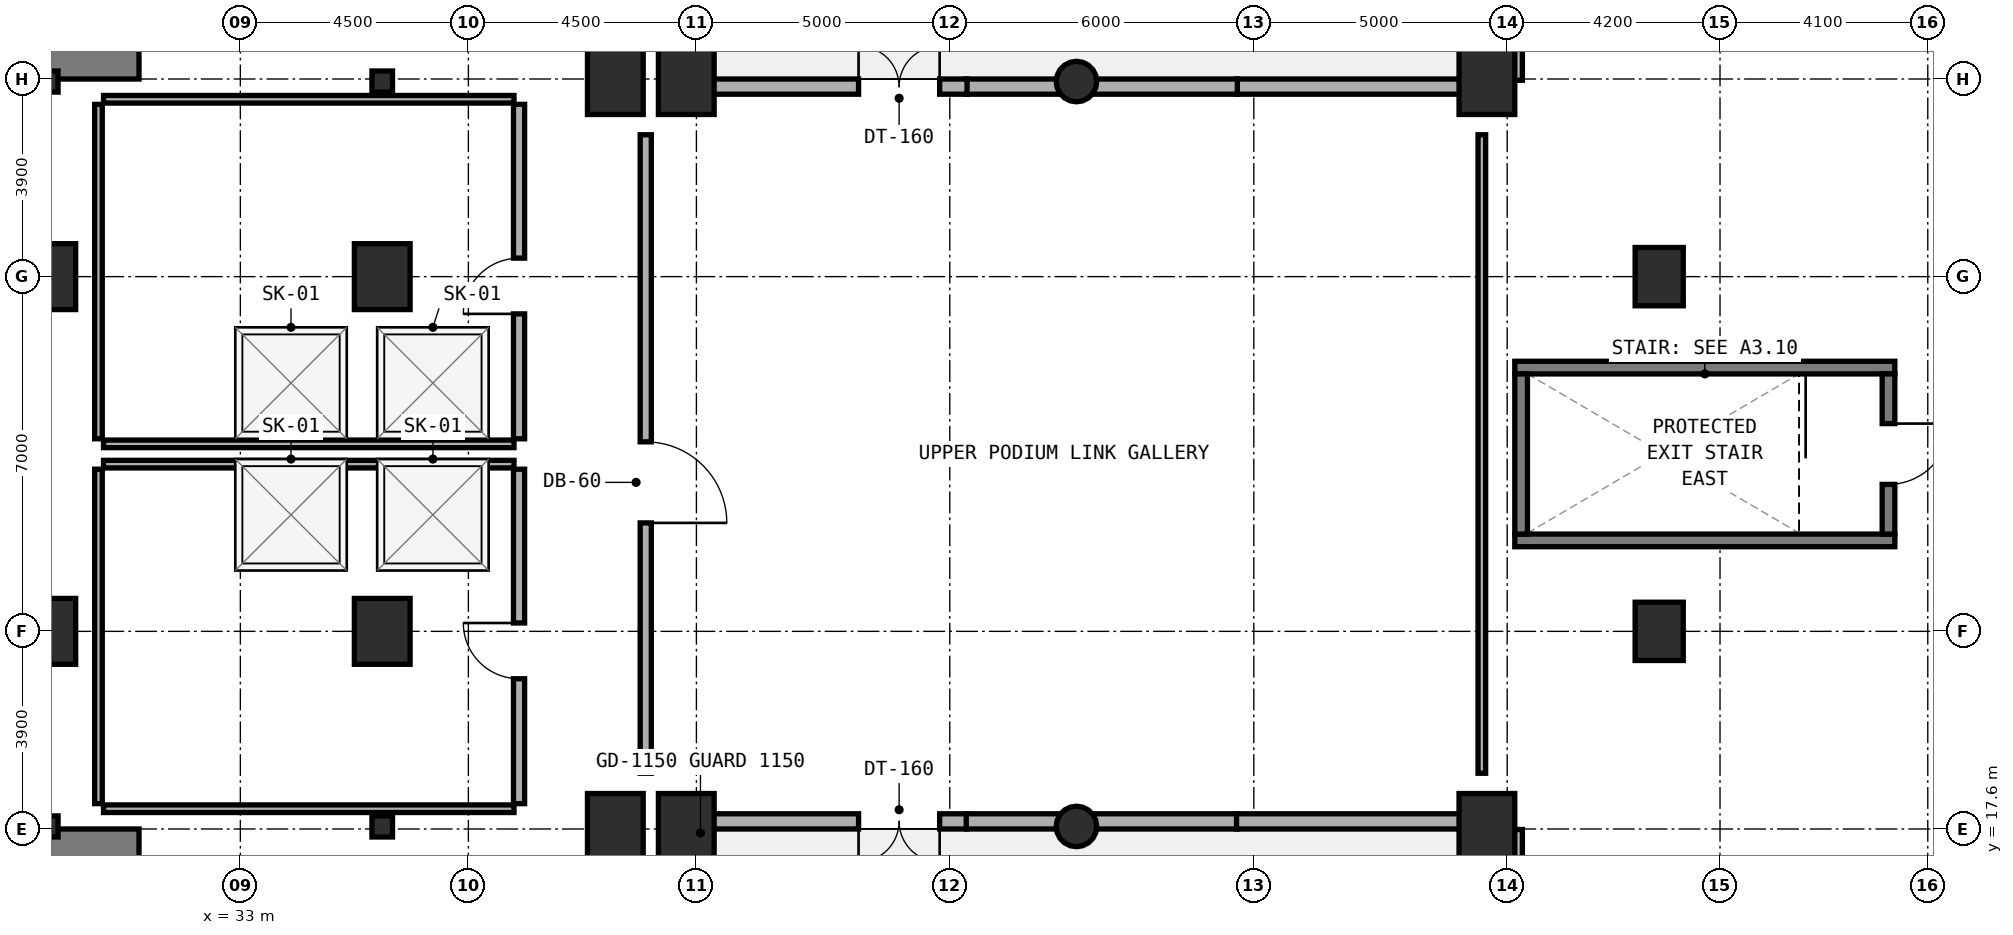
"""IFC4 building model, lengths in metres.
Left out: names, types, materials, properties, quantities, classifications, styles, units other than length and angle.
Written with IfcOpenShell. Run it as: python <this file> out.ifc"""

import sys

from ifc_helpers import new_model, si_unit, direction, frame, frame_2d, origin, origin_2d, place, context, subcontext, project, spatial, rectangle, circle, i_section, extrude, element, fill, save


model = new_model("IFC4")
c1 = context("Model", 3, precision=1e-05, world=origin(), true_north=direction((0.0, 1.0)))
c2 = subcontext(c1, "Body", "Model", "MODEL_VIEW")
j1 = project(units=[si_unit("LENGTHUNIT", "METRE"), si_unit("PLANEANGLEUNIT", "RADIAN")], contexts=[c1])
p1 = place(None, origin())
s1 = spatial("IfcSite", under=j1, at=p1, CompositionType="ELEMENT")
p2 = place(p1, origin())
s2 = spatial("IfcBuilding", under=s1, at=p2, CompositionType="ELEMENT")
p3 = place(p2, frame((0.0, 0.0, 19.5)))
s3 = spatial("IfcBuildingStorey", under=s2, at=p3, CompositionType="ELEMENT", Elevation=19.5)
for number, where, z_axis, x_axis in (
    (1, (6.2, 32.7, 0.0), (0.0, 0.0, 1.0), (1.0, 0.0, 0.0)),
    (2, (6.2, 17.3, 0.0), (0.0, 0.0, 1.0), (1.0, 0.0, 0.0)),
):
    element("IfcWall", number, at=place(p3, frame(where, z_axis=z_axis, x_axis=x_axis)), inside=s3, PredefinedType="SHEAR", context=c2, shape_type="SweptSolid", body=[
        extrude(rectangle(XDim=24.8, YDim=0.6, at=frame_2d((12.4, 0.0))), origin(), (0.0, 0.0, 1.0), 4.5),
    ])
for number, where, z_axis, x_axis in (
    (3, (58.15, 23.295, 0.0), (0.0, 0.0, 1.0), (1.0, 0.0, 0.0)),
    (4, (58.15, 26.705, 0.0), (0.0, 0.0, 1.0), (1.0, 0.0, 0.0)),
):
    element("IfcWall", number, at=place(p3, frame(where, z_axis=z_axis, x_axis=x_axis)), inside=s3, PredefinedType="STANDARD", context=c2, shape_type="SweptSolid", body=[
        extrude(rectangle(XDim=7.5, YDim=0.25, at=frame_2d((3.75, 0.0))), origin(), (0.0, 0.0, 1.0), 4.5),
    ])
p4 = place(p3, frame((58.275, 23.42, 0.0), z_axis=(0.0, 0.0, 1.0), x_axis=(0.0, 1.0, 0.0)))
e5 = element("IfcWall", 5, at=p4, inside=s3, PredefinedType="STANDARD", context=c2, shape_type="SweptSolid", body=[
    extrude(rectangle(XDim=3.16, YDim=0.25, at=frame_2d((1.58, 0.0))), origin(), (0.0, 0.0, 1.0), 4.5),
])
p5 = place(p3, frame((65.525, 23.42, 0.0), z_axis=(0.0, 0.0, 1.0), x_axis=(0.0, 1.0, 0.0)))
e6 = element("IfcWall", 6, at=p5, inside=s3, PredefinedType="STANDARD", context=c2, shape_type="SweptSolid", body=[
    extrude(rectangle(XDim=3.16, YDim=0.25, at=frame_2d((1.58, 0.0))), origin(), (0.0, 0.0, 1.0), 4.5),
])
p6 = place(p5, frame((0.98, 0.0, 0.0)))
e7 = element("IfcOpeningElement", 7, at=p6, cuts=e6, PredefinedType="OPENING", context=c2, shape_type="SweptSolid", body=[
    extrude(rectangle(XDim=1.2, YDim=2.15, at=frame_2d((0.6, 1.075))), frame((0.0, 0.135, 0.0), z_axis=(0.0, -1.0, 0.0), x_axis=(1.0, 0.0, 0.0)), (0.0, 0.0, 1.0), 0.27),
])
for number, where, z_axis, x_axis in (
    (8, (35.8, 21.5, 0.0), (0.0, 0.0, 1.0), (1.0, 0.0, 0.0)),
    (9, (35.8, 28.5, 0.0), (0.0, 0.0, 1.0), (1.0, 0.0, 0.0)),
):
    element("IfcColumn", number, at=place(p3, frame(where, z_axis=z_axis, x_axis=x_axis)), inside=s3, PredefinedType="COLUMN", context=c2, shape_type="SweptSolid", body=[
        extrude(rectangle(XDim=1.1, YDim=1.3, at=origin_2d()), origin(), (0.0, 0.0, 1.0), 4.5),
    ])
for number, where, z_axis, x_axis in (
    (10, (35.8, 17.65, 0.0), (0.0, 0.0, 1.0), (1.0, 0.0, 0.0)),
    (11, (35.8, 32.35, 0.0), (0.0, 0.0, 1.0), (1.0, 0.0, 0.0)),
    (12, (29.2, 17.65, 0.0), (0.0, 0.0, 1.0), (1.0, 0.0, 0.0)),
    (13, (29.2, 32.35, 0.0), (0.0, 0.0, 1.0), (1.0, 0.0, 0.0)),
):
    element("IfcColumn", number, at=place(p3, frame(where, z_axis=z_axis, x_axis=x_axis)), inside=s3, PredefinedType="COLUMN", context=c2, shape_type="SweptSolid", body=[
        extrude(i_section(OverallWidth=0.406, OverallDepth=0.416, WebThickness=0.024, FlangeThickness=0.039, FilletRadius=0.015, at=origin_2d()), origin(), (0.0, 0.0, 1.0), 4.5),
    ])
for number, where, z_axis, x_axis in (
    (14, (29.2, 21.5, 0.0), (0.0, 0.0, 1.0), (1.0, 0.0, 0.0)),
    (15, (29.2, 28.5, 0.0), (0.0, 0.0, 1.0), (1.0, 0.0, 0.0)),
    (16, (40.4, 17.65, 0.0), (0.0, 0.0, 1.0), (1.0, 0.0, 0.0)),
    (17, (40.4, 32.35, 0.0), (0.0, 0.0, 1.0), (1.0, 0.0, 0.0)),
):
    element("IfcColumn", number, at=place(p3, frame(where, z_axis=z_axis, x_axis=x_axis)), inside=s3, PredefinedType="COLUMN", context=c2, shape_type="SweptSolid", body=[
        extrude(rectangle(XDim=1.1, YDim=1.3, at=origin_2d()), origin(), (0.0, 0.0, 1.0), 4.5),
    ])
for number, where, z_axis, x_axis in (
    (18, (61.0, 21.5, 0.0), (0.0, 0.0, 1.0), (1.0, 0.0, 0.0)),
    (19, (61.0, 28.5, 0.0), (0.0, 0.0, 1.0), (1.0, 0.0, 0.0)),
):
    element("IfcColumn", number, at=place(p3, frame(where, z_axis=z_axis, x_axis=x_axis)), inside=s3, PredefinedType="COLUMN", context=c2, shape_type="SweptSolid", body=[
        extrude(rectangle(XDim=0.95, YDim=1.15, at=origin_2d()), origin(), (0.0, 0.0, 1.0), 4.5),
    ])
for number, where, z_axis, x_axis in (
    (20, (41.8, 17.65, 0.0), (0.0, 0.0, 1.0), (1.0, 0.0, 0.0)),
    (21, (41.8, 32.35, 0.0), (0.0, 0.0, 1.0), (1.0, 0.0, 0.0)),
):
    element("IfcColumn", number, at=place(p3, frame(where, z_axis=z_axis, x_axis=x_axis)), inside=s3, PredefinedType="COLUMN", context=c2, shape_type="SweptSolid", body=[
        extrude(rectangle(XDim=1.1, YDim=1.3, at=origin_2d()), origin(), (0.0, 0.0, 1.0), 4.5),
    ])
for number, where, z_axis, x_axis in (
    (22, (49.5, 17.65, 0.0), (0.0, 0.0, 1.0), (1.0, 0.0, 0.0)),
    (23, (49.5, 32.35, 0.0), (0.0, 0.0, 1.0), (1.0, 0.0, 0.0)),
):
    element("IfcColumn", number, at=place(p3, frame(where, z_axis=z_axis, x_axis=x_axis)), inside=s3, PredefinedType="COLUMN", context=c2, shape_type="SweptSolid", body=[
        extrude(circle(Radius=0.4, at=origin_2d()), origin(), (0.0, 0.0, 1.0), 4.5),
    ])
for number, where, z_axis, x_axis in (
    (24, (57.6, 17.65, 0.0), (0.0, 0.0, 1.0), (1.0, 0.0, 0.0)),
    (25, (57.6, 32.35, 0.0), (0.0, 0.0, 1.0), (1.0, 0.0, 0.0)),
):
    element("IfcColumn", number, at=place(p3, frame(where, z_axis=z_axis, x_axis=x_axis)), inside=s3, PredefinedType="COLUMN", context=c2, shape_type="SweptSolid", body=[
        extrude(rectangle(XDim=1.1, YDim=1.3, at=origin_2d()), origin(), (0.0, 0.0, 1.0), 4.5),
    ])
p7 = place(p3, frame((41.85, 5.945, 0.0), z_axis=(0.0, 0.0, 1.0), x_axis=(0.0, 1.0, 0.0)))
e26 = element("IfcWall", 26, at=p7, inside=s3, PredefinedType="STANDARD", context=c2, shape_type="SweptSolid", body=[
    extrude(rectangle(XDim=11.68, YDim=0.3, at=frame_2d((5.84, 0.0))), origin(), (0.0, 0.0, 1.0), 4.22),
])
p8 = place(p3, frame((42.01, 17.75, 0.0), z_axis=(0.0, 0.0, 1.0), x_axis=(1.0, 0.0, 0.0)))
e27 = element("IfcWall", 27, at=p8, inside=s3, PredefinedType="STANDARD", context=c2, shape_type="SweptSolid", body=[
    extrude(rectangle(XDim=5.331, YDim=0.3, at=frame_2d((2.666, 0.0))), origin(), (0.0, 0.0, 1.0), 4.22),
])
p9 = place(p8, frame((3.19, 0.0, 0.0)))
e28 = element("IfcOpeningElement", 28, at=p9, cuts=e27, PredefinedType="OPENING", context=c2, shape_type="SweptSolid", body=[
    extrude(rectangle(XDim=1.6, YDim=2.2, at=frame_2d((0.8, 1.1))), frame((0.0, 0.16, 0.0), z_axis=(0.0, -1.0, 0.0), x_axis=(1.0, 0.0, 0.0)), (0.0, 0.0, 1.0), 0.32),
])
p10 = place(p3, frame((47.325, 17.75, 0.0), z_axis=(0.0, 0.0, 1.0), x_axis=(1.0, 0.0, 0.0)))
e29 = element("IfcWall", 29, at=p10, inside=s3, PredefinedType="STANDARD", context=c2, shape_type="SweptSolid", body=[
    extrude(rectangle(XDim=5.35, YDim=0.3, at=frame_2d((2.675, 0.0))), origin(), (0.0, 0.0, 1.0), 4.22),
])
p11 = place(p3, frame((52.659, 17.75, 0.0), z_axis=(0.0, 0.0, 1.0), x_axis=(1.0, 0.0, 0.0)))
e30 = element("IfcWall", 30, at=p11, inside=s3, PredefinedType="STANDARD", context=c2, shape_type="SweptSolid", body=[
    extrude(rectangle(XDim=5.366, YDim=0.3, at=frame_2d((2.683, 0.0))), origin(), (0.0, 0.0, 1.0), 4.22),
])
p12 = place(p3, frame((58.15, 17.59, 0.0), z_axis=(0.0, 0.0, 1.0), x_axis=(0.0, -1.0, 0.0)))
e31 = element("IfcWall", 31, at=p12, inside=s3, PredefinedType="STANDARD", context=c2, shape_type="SweptSolid", body=[
    extrude(rectangle(XDim=11.645, YDim=0.3, at=frame_2d((5.823, 0.0))), origin(), (0.0, 0.0, 1.0), 4.22),
])
p13 = place(p3, frame((58.15, 44.055, 0.0), z_axis=(0.0, 0.0, 1.0), x_axis=(0.0, -1.0, 0.0)))
e32 = element("IfcWall", 32, at=p13, inside=s3, PredefinedType="STANDARD", context=c2, shape_type="SweptSolid", body=[
    extrude(rectangle(XDim=11.68, YDim=0.3, at=frame_2d((5.84, 0.0))), origin(), (0.0, 0.0, 1.0), 4.22),
])
p14 = place(p3, frame((57.99, 32.25, 0.0), z_axis=(0.0, 0.0, 1.0), x_axis=(-1.0, 0.0, 0.0)))
e33 = element("IfcWall", 33, at=p14, inside=s3, PredefinedType="STANDARD", context=c2, shape_type="SweptSolid", body=[
    extrude(rectangle(XDim=5.331, YDim=0.3, at=frame_2d((2.666, 0.0))), origin(), (0.0, 0.0, 1.0), 4.22),
])
p15 = place(p3, frame((52.675, 32.25, 0.0), z_axis=(0.0, 0.0, 1.0), x_axis=(-1.0, 0.0, 0.0)))
e34 = element("IfcWall", 34, at=p15, inside=s3, PredefinedType="STANDARD", context=c2, shape_type="SweptSolid", body=[
    extrude(rectangle(XDim=5.35, YDim=0.3, at=frame_2d((2.675, 0.0))), origin(), (0.0, 0.0, 1.0), 4.22),
])
p16 = place(p3, frame((47.341, 32.25, 0.0), z_axis=(0.0, 0.0, 1.0), x_axis=(-1.0, 0.0, 0.0)))
e35 = element("IfcWall", 35, at=p16, inside=s3, PredefinedType="STANDARD", context=c2, shape_type="SweptSolid", body=[
    extrude(rectangle(XDim=5.366, YDim=0.3, at=frame_2d((2.683, 0.0))), origin(), (0.0, 0.0, 1.0), 4.22),
])
p17 = place(p16, frame((0.541, 0.0, 0.0)))
e36 = element("IfcOpeningElement", 36, at=p17, cuts=e35, PredefinedType="OPENING", context=c2, shape_type="SweptSolid", body=[
    extrude(rectangle(XDim=1.6, YDim=2.2, at=frame_2d((0.8, 1.1))), frame((0.0, 0.16, 0.0), z_axis=(0.0, -1.0, 0.0), x_axis=(1.0, 0.0, 0.0)), (0.0, 0.0, 1.0), 0.32),
])
p18 = place(p3, frame((41.85, 32.41, 0.0), z_axis=(0.0, 0.0, 1.0), x_axis=(0.0, 1.0, 0.0)))
e37 = element("IfcWall", 37, at=p18, inside=s3, PredefinedType="STANDARD", context=c2, shape_type="SweptSolid", body=[
    extrude(rectangle(XDim=11.645, YDim=0.3, at=frame_2d((5.823, 0.0))), origin(), (0.0, 0.0, 1.0), 4.22),
])
p19 = place(p3, frame((30.2, 18.1, 0.0), z_axis=(0.0, 0.0, 1.0), x_axis=(0.0, 1.0, 0.0)))
e38 = element("IfcWall", 38, at=p19, inside=s3, PredefinedType="PARTITIONING", context=c2, shape_type="SweptSolid", body=[
    extrude(rectangle(XDim=6.6, YDim=0.15, at=frame_2d((3.3, 0.0))), origin(), (0.0, 0.0, 1.0), 3.295),
])
for number, where, z_axis, x_axis in (
    (39, (30.3, 18.0, 0.0), (0.0, 0.0, 1.0), (1.0, 0.0, 0.0)),
    (40, (30.3, 24.8, 0.0), (0.0, 0.0, 1.0), (1.0, 0.0, 0.0)),
):
    element("IfcWall", number, at=place(p3, frame(where, z_axis=z_axis, x_axis=x_axis)), inside=s3, PredefinedType="PARTITIONING", context=c2, shape_type="SweptSolid", body=[
        extrude(rectangle(XDim=8.1, YDim=0.15, at=frame_2d((4.05, 0.0))), origin(), (0.0, 0.0, 1.0), 3.745),
    ])
p20 = place(p3, frame((38.5, 18.1, 0.0), z_axis=(0.0, 0.0, 1.0), x_axis=(0.0, 1.0, 0.0)))
e41 = element("IfcWall", 41, at=p20, inside=s3, PredefinedType="SOLIDWALL", context=c2, shape_type="SweptSolid", body=[
    extrude(rectangle(XDim=6.6, YDim=0.22, at=frame_2d((3.3, 0.0))), origin(), (0.0, 0.0, 1.0), 4.22),
])
p21 = place(p20, frame((2.465, 0.0, 0.0)))
e42 = element("IfcOpeningElement", 42, at=p21, cuts=e41, PredefinedType="OPENING", context=c2, shape_type="SweptSolid", body=[
    extrude(rectangle(XDim=1.1, YDim=2.1, at=frame_2d((0.55, 1.05))), frame((0.0, 0.12, 0.0), z_axis=(0.0, -1.0, 0.0), x_axis=(1.0, 0.0, 0.0)), (0.0, 0.0, 1.0), 0.24),
])
p22 = place(p3, frame((30.2, 25.3, 0.0), z_axis=(0.0, 0.0, 1.0), x_axis=(0.0, 1.0, 0.0)))
e43 = element("IfcWall", 43, at=p22, inside=s3, PredefinedType="PARTITIONING", context=c2, shape_type="SweptSolid", body=[
    extrude(rectangle(XDim=6.6, YDim=0.15, at=frame_2d((3.3, 0.0))), origin(), (0.0, 0.0, 1.0), 3.295),
])
for number, where, z_axis, x_axis in (
    (44, (30.3, 25.2, 0.0), (0.0, 0.0, 1.0), (1.0, 0.0, 0.0)),
    (45, (30.3, 32.0, 0.0), (0.0, 0.0, 1.0), (1.0, 0.0, 0.0)),
):
    element("IfcWall", number, at=place(p3, frame(where, z_axis=z_axis, x_axis=x_axis)), inside=s3, PredefinedType="PARTITIONING", context=c2, shape_type="SweptSolid", body=[
        extrude(rectangle(XDim=8.1, YDim=0.15, at=frame_2d((4.05, 0.0))), origin(), (0.0, 0.0, 1.0), 3.745),
    ])
p23 = place(p3, frame((38.5, 25.3, 0.0), z_axis=(0.0, 0.0, 1.0), x_axis=(0.0, 1.0, 0.0)))
e46 = element("IfcWall", 46, at=p23, inside=s3, PredefinedType="SOLIDWALL", context=c2, shape_type="SweptSolid", body=[
    extrude(rectangle(XDim=6.6, YDim=0.22, at=frame_2d((3.3, 0.0))), origin(), (0.0, 0.0, 1.0), 4.22),
])
p24 = place(p23, frame((2.465, 0.0, 0.0)))
e47 = element("IfcOpeningElement", 47, at=p24, cuts=e46, PredefinedType="OPENING", context=c2, shape_type="SweptSolid", body=[
    extrude(rectangle(XDim=1.1, YDim=2.1, at=frame_2d((0.55, 1.05))), frame((0.0, 0.12, 0.0), z_axis=(0.0, -1.0, 0.0), x_axis=(1.0, 0.0, 0.0)), (0.0, 0.0, 1.0), 0.24),
])
p25 = place(p3, frame((57.5, 18.7, 0.0), z_axis=(0.0, 0.0, 1.0), x_axis=(0.0, 1.0, 0.0)))
e48 = element("IfcWall", 48, at=p25, inside=s3, PredefinedType="PARTITIONING", context=c2, shape_type="SweptSolid", body=[
    extrude(rectangle(XDim=12.6, YDim=0.15, at=frame_2d((6.3, 0.0))), origin(), (0.0, 0.0, 1.0), 4.22),
])
p26 = place(p3, frame((41.0, 18.7, 0.0), z_axis=(0.0, 0.0, 1.0), x_axis=(0.0, 1.0, 0.0)))
e49 = element("IfcWall", 49, at=p26, inside=s3, PredefinedType="SOLIDWALL", context=c2, shape_type="SweptSolid", body=[
    extrude(rectangle(XDim=12.6, YDim=0.22, at=frame_2d((6.3, 0.0))), origin(), (0.0, 0.0, 1.0), 4.22),
])
p27 = place(p26, frame((4.94, 0.0, 0.0)))
e50 = element("IfcOpeningElement", 50, at=p27, cuts=e49, PredefinedType="OPENING", context=c2, shape_type="SweptSolid", body=[
    extrude(rectangle(XDim=1.6, YDim=2.15, at=frame_2d((0.8, 1.075))), frame((0.0, 0.12, 0.0), z_axis=(0.0, -1.0, 0.0), x_axis=(1.0, 0.0, 0.0)), (0.0, 0.0, 1.0), 0.24),
])
p28 = place(p9, frame((1.6, 0.0, 0.0), z_axis=(0.0, 0.0, 1.0), x_axis=(-1.0, 0.0, 0.0)))
e51 = element("IfcDoor", 51, at=p28, inside=s3, OperationType="DOUBLE_DOOR_SINGLE_SWING", PredefinedType="DOOR", context=c2, shape_type="SweptSolid", body=[
    extrude(rectangle(XDim=1.6, YDim=2.2, at=frame_2d((0.8, 1.1))), frame((0.0, 0.025, 0.0), z_axis=(0.0, -1.0, 0.0), x_axis=(1.0, 0.0, 0.0)), (0.0, 0.0, 1.0), 0.05),
])
fill(e28, e51)
p29 = place(p17, frame((1.6, 0.0, 0.0), z_axis=(0.0, 0.0, 1.0), x_axis=(-1.0, 0.0, 0.0)))
e52 = element("IfcDoor", 52, at=p29, inside=s3, OperationType="DOUBLE_DOOR_SINGLE_SWING", PredefinedType="DOOR", context=c2, shape_type="SweptSolid", body=[
    extrude(rectangle(XDim=1.6, YDim=2.2, at=frame_2d((0.8, 1.1))), frame((0.0, 0.025, 0.0), z_axis=(0.0, -1.0, 0.0), x_axis=(1.0, 0.0, 0.0)), (0.0, 0.0, 1.0), 0.05),
])
fill(e36, e52)
p30 = place(p3, frame((0.0, 0.0, -0.4)))
p31 = place(p30, frame((34.0, 23.8, 0.0)))
p32 = place(p31, frame((0.0, 0.0, 0.35)))
e53 = element("IfcWindow", 53, at=p32, inside=s3, PartitioningType="SINGLE_PANEL", PredefinedType="SKYLIGHT", context=c2, shape_type="SweptSolid", body=[
    extrude(rectangle(XDim=2.2, YDim=2.2, at=origin_2d()), origin(), (0.0, 0.0, 1.0), 0.05),
])
p33 = place(p30, frame((36.8, 23.8, 0.0)))
p34 = place(p33, frame((0.0, 0.0, 0.35)))
e54 = element("IfcWindow", 54, at=p34, inside=s3, PartitioningType="SINGLE_PANEL", PredefinedType="SKYLIGHT", context=c2, shape_type="SweptSolid", body=[
    extrude(rectangle(XDim=2.2, YDim=2.2, at=origin_2d()), origin(), (0.0, 0.0, 1.0), 0.05),
])
p35 = place(p30, frame((34.0, 26.4, 0.0)))
p36 = place(p35, frame((0.0, 0.0, 0.35)))
e55 = element("IfcWindow", 55, at=p36, inside=s3, PartitioningType="SINGLE_PANEL", PredefinedType="SKYLIGHT", context=c2, shape_type="SweptSolid", body=[
    extrude(rectangle(XDim=2.2, YDim=2.2, at=origin_2d()), origin(), (0.0, 0.0, 1.0), 0.05),
])
p37 = place(p30, frame((36.8, 26.4, 0.0)))
p38 = place(p37, frame((0.0, 0.0, 0.35)))
e56 = element("IfcWindow", 56, at=p38, inside=s3, PartitioningType="SINGLE_PANEL", PredefinedType="SKYLIGHT", context=c2, shape_type="SweptSolid", body=[
    extrude(rectangle(XDim=2.2, YDim=2.2, at=origin_2d()), origin(), (0.0, 0.0, 1.0), 0.05),
])
p39 = place(p6, frame((1.2, 0.0, 0.0), z_axis=(0.0, 0.0, 1.0), x_axis=(-1.0, 0.0, 0.0)))
e57 = element("IfcDoor", 57, at=p39, inside=s3, OperationType="SINGLE_SWING_LEFT", PredefinedType="DOOR", context=c2, shape_type="SweptSolid", body=[
    extrude(rectangle(XDim=1.2, YDim=2.15, at=frame_2d((0.6, 1.075))), frame((0.0, 0.025, 0.0), z_axis=(0.0, -1.0, 0.0), x_axis=(1.0, 0.0, 0.0)), (0.0, 0.0, 1.0), 0.05),
])
fill(e7, e57)
p40 = place(p21, origin())
e58 = element("IfcDoor", 58, at=p40, inside=s3, OperationType="SINGLE_SWING_RIGHT", PredefinedType="DOOR", context=c2, shape_type="SweptSolid", body=[
    extrude(rectangle(XDim=1.1, YDim=2.1, at=frame_2d((0.55, 1.05))), frame((0.0, 0.025, 0.0), z_axis=(0.0, -1.0, 0.0), x_axis=(1.0, 0.0, 0.0)), (0.0, 0.0, 1.0), 0.05),
])
fill(e42, e58)
p41 = place(p24, origin())
e59 = element("IfcDoor", 59, at=p41, inside=s3, OperationType="SINGLE_SWING_LEFT", PredefinedType="DOOR", context=c2, shape_type="SweptSolid", body=[
    extrude(rectangle(XDim=1.1, YDim=2.1, at=frame_2d((0.55, 1.05))), frame((0.0, 0.025, 0.0), z_axis=(0.0, -1.0, 0.0), x_axis=(1.0, 0.0, 0.0)), (0.0, 0.0, 1.0), 0.05),
])
fill(e47, e59)
p42 = place(p27, frame((1.6, 0.0, 0.0), z_axis=(0.0, 0.0, 1.0), x_axis=(-1.0, 0.0, 0.0)))
e60 = element("IfcDoor", 60, at=p42, inside=s3, OperationType="SINGLE_SWING_RIGHT", PredefinedType="DOOR", context=c2, shape_type="SweptSolid", body=[
    extrude(rectangle(XDim=1.6, YDim=2.15, at=frame_2d((0.8, 1.075))), frame((0.0, 0.025, 0.0), z_axis=(0.0, -1.0, 0.0), x_axis=(1.0, 0.0, 0.0)), (0.0, 0.0, 1.0), 0.05),
])
fill(e50, e60)
save(model, sys.argv[1])
